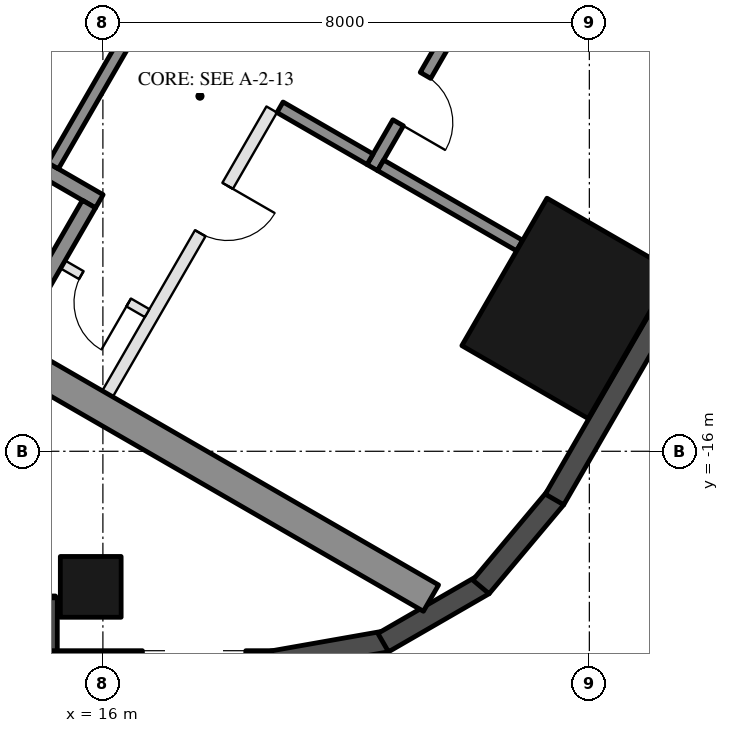
"""IFC4 building model, lengths in metres.
Left out: names, types, materials, properties, quantities, classifications, styles, units other than length and angle.
Written with IfcOpenShell. Run it as: python <this file> out.ifc"""

import sys

from ifc_helpers import new_model, si_unit, direction, frame, frame_2d, origin, origin_2d, place, context, subcontext, project, spatial, rectangle, hollow_rectangle, extrude, element, fill, save


model = new_model("IFC4")
c1 = context("Model", 3, precision=1e-05, world=origin(), true_north=direction((0.0, 1.0)))
c2 = subcontext(c1, "Body", "Model", "MODEL_VIEW")
j1 = project(units=[si_unit("LENGTHUNIT", "METRE"), si_unit("PLANEANGLEUNIT", "RADIAN")], contexts=[c1])
p1 = place(None, origin())
s1 = spatial("IfcSite", under=j1, at=p1, CompositionType="ELEMENT")
p2 = place(p1, origin())
s2 = spatial("IfcBuilding", under=s1, at=p2, CompositionType="ELEMENT")
p3 = place(p2, frame((0.0, 0.0, 65.0)))
s3 = spatial("IfcBuildingStorey", under=s2, at=p3, CompositionType="ELEMENT", Elevation=65.0)
p4 = place(p3, frame((15.8, -18.23, 0.0), z_axis=(0.0, 0.0, 1.0), x_axis=(-1.0, 0.0, 0.0)))
e1 = element("IfcColumn", 1, at=p4, inside=s3, PredefinedType="COLUMN", context=c2, shape_type="SweptSolid", body=[
    extrude(hollow_rectangle(XDim=1.0, YDim=1.0, WallThickness=0.045, at=origin_2d()), origin(), (0.0, 0.0, 1.0), 3.7),
])
p5 = place(p3, frame((23.643, -13.65, 0.0), z_axis=(0.0, 0.0, 1.0), x_axis=(0.5, 0.866025403784, 0.0)))
e2 = element("IfcColumn", 2, at=p5, inside=s3, PredefinedType="COLUMN", context=c2, shape_type="SweptSolid", body=[
    extrude(hollow_rectangle(XDim=2.8, YDim=2.4, WallThickness=0.07, at=origin_2d()), origin(), (0.0, 0.0, 1.0), 3.7),
])
p6 = place(p3, frame((8.48, -18.555, 0.0), z_axis=(0.0, 0.0, 1.0), x_axis=(1.0, 0.0, 0.0)))
e3 = element("IfcWall", 3, at=p6, inside=s3, PredefinedType="SOLIDWALL", context=c2, shape_type="SweptSolid", body=[
    extrude(rectangle(XDim=6.74, YDim=0.35, at=frame_2d((3.37, 0.0))), origin(), (0.0, 0.0, 1.0), 3.55),
])
p7 = place(p6, frame((3.57, 0.0, 0.0)))
e4 = element("IfcOpeningElement", 4, at=p7, cuts=e3, PredefinedType="OPENING", context=c2, shape_type="SweptSolid", body=[
    extrude(rectangle(XDim=2.4, YDim=2.4, at=frame_2d((1.2, 1.2))), frame((0.0, 0.185, 0.0), z_axis=(0.0, -1.0, 0.0), x_axis=(1.0, 0.0, 0.0)), (0.0, 0.0, 1.0), 0.37),
])
p8 = place(p6, frame((0.77, 0.0, 0.3)))
e5 = element("IfcOpeningElement", 5, at=p8, cuts=e3, PredefinedType="OPENING", context=c2, shape_type="SweptSolid", body=[
    extrude(rectangle(XDim=2.5, YDim=2.65, at=frame_2d((1.25, 1.325))), frame((0.0, 0.185, 0.0), z_axis=(0.0, -1.0, 0.0), x_axis=(1.0, 0.0, 0.0)), (0.0, 0.0, 1.0), 0.37),
])
p9 = place(p3, frame((15.075, -18.41, 0.0), z_axis=(0.0, 0.0, 1.0), x_axis=(0.0, -1.0, 0.0)))
e6 = element("IfcWall", 6, at=p9, inside=s3, PredefinedType="SOLIDWALL", context=c2, shape_type="SweptSolid", body=[
    extrude(rectangle(XDim=1.22, YDim=0.35, at=frame_2d((0.61, 0.0))), origin(), (0.0, 0.0, 1.0), 3.55),
])
p10 = place(p3, frame((14.9, -19.455, 0.0), z_axis=(0.0, 0.0, 1.0), x_axis=(1.0, 0.0, 0.0)))
e7 = element("IfcWall", 7, at=p10, inside=s3, PredefinedType="SOLIDWALL", context=c2, shape_type="SweptSolid", body=[
    extrude(rectangle(XDim=3.916, YDim=0.35, at=frame_2d((1.958, 0.0))), origin(), (0.0, 0.0, 1.0), 3.55),
])
p11 = place(p10, frame((1.75, 0.0, 0.3)))
e8 = element("IfcOpeningElement", 8, at=p11, cuts=e7, PredefinedType="OPENING", context=c2, shape_type="SweptSolid", body=[
    extrude(rectangle(XDim=1.7, YDim=2.65, at=frame_2d((0.85, 1.325))), frame((0.0, 0.185, 0.0), z_axis=(0.0, -1.0, 0.0), x_axis=(1.0, 0.0, 0.0)), (0.0, 0.0, 1.0), 0.37),
])
p12 = place(p3, frame((18.785, -19.458, 0.0), z_axis=(0.0, 0.0, 1.0), x_axis=(0.984798995425, 0.173697837091, 0.0)))
e9 = element("IfcWall", 9, at=p12, inside=s3, PredefinedType="SOLIDWALL", context=c2, shape_type="SweptSolid", body=[
    extrude(rectangle(XDim=1.91, YDim=0.35, at=frame_2d((0.955, 0.0))), origin(), (0.0, 0.0, 1.0), 3.55),
])
for number, where, z_axis, x_axis in (
    (10, (20.61, -19.147, 0.0), (0.0, 0.0, 1.0), (0.866, 0.5, 0.0)),
    (11, (22.217, -18.231, 0.0), (0.0, 0.0, 1.0), (0.643, 0.766, 0.0)),
):
    element("IfcWall", number, at=place(p3, frame(where, z_axis=z_axis, x_axis=x_axis)), inside=s3, PredefinedType="SOLIDWALL", context=c2, shape_type="SweptSolid", body=[
        extrude(rectangle(XDim=1.91, YDim=0.35, at=frame_2d((0.955, 0.0))), origin(), (0.0, 0.0, 1.0), 3.55),
    ])
p13 = place(p3, frame((23.427, -16.792, 0.0), z_axis=(0.0, 0.0, 1.0), x_axis=(0.500018773155, 0.866014564827, 0.0)))
e12 = element("IfcWall", 12, at=p13, inside=s3, PredefinedType="SOLIDWALL", context=c2, shape_type="SweptSolid", body=[
    extrude(rectangle(XDim=5.658, YDim=0.35, at=frame_2d((2.829, 0.0))), origin(), (0.0, 0.0, 1.0), 3.55),
])
for number, where, z_axis, x_axis in (
    (13, (8.547, -10.997, 0.0), (0.0, 0.0, 1.0), (0.866, -0.5, 0.0)),
    (14, (13.797, -1.903, 0.0), (0.0, 0.0, 1.0), (0.866, -0.5, 0.0)),
):
    element("IfcWall", number, at=place(p3, frame(where, z_axis=z_axis, x_axis=x_axis)), inside=s3, PredefinedType="SHEAR", context=c2, shape_type="SweptSolid", body=[
        extrude(rectangle(XDim=14.837, YDim=0.5, at=frame_2d((7.418, 0.0))), origin(), (0.0, 0.0, 1.0), 3.5),
    ])
p14 = place(p3, frame((10.356, -8.664, 0.0), z_axis=(0.0, 0.0, 1.0), x_axis=(0.866028629588, -0.499994412703, 0.0)))
e15 = element("IfcWall", 15, at=p14, inside=s3, PredefinedType="SHEAR", context=c2, shape_type="SweptSolid", body=[
    extrude(rectangle(XDim=6.45, YDim=0.25, at=frame_2d((3.225, 0.0))), origin(), (0.0, 0.0, 1.0), 3.5),
])
p15 = place(p14, frame((0.3, 0.0, 0.0)))
e16 = element("IfcOpeningElement", 16, at=p15, cuts=e15, PredefinedType="OPENING", context=c2, shape_type="SweptSolid", body=[
    extrude(rectangle(XDim=1.0, YDim=2.1, at=frame_2d((0.5, 1.05))), frame((0.0, 0.135, 0.0), z_axis=(0.0, -1.0, 0.0), x_axis=(1.0, 0.0, 0.0)), (0.0, 0.0, 1.0), 0.27),
])
p16 = place(p3, frame((14.496, -14.143, 0.0), z_axis=(0.0, 0.0, 1.0), x_axis=(0.500062241894, 0.865989465428, 0.0)))
e17 = element("IfcWall", 17, at=p16, inside=s3, PredefinedType="SHEAR", context=c2, shape_type="SweptSolid", body=[
    extrude(rectangle(XDim=2.55, YDim=0.25, at=frame_2d((1.275, 0.0))), origin(), (0.0, 0.0, 1.0), 3.5),
])
p17 = place(p3, frame((15.181, -11.305, 0.0), z_axis=(0.0, 0.0, 1.0), x_axis=(0.49994636267, 0.866056369097, 0.0)))
e18 = element("IfcWall", 18, at=p17, inside=s3, PredefinedType="SHEAR", context=c2, shape_type="SweptSolid", body=[
    extrude(rectangle(XDim=2.8, YDim=0.2, at=frame_2d((1.4, 0.0))), origin(), (0.0, 0.0, 1.0), 3.5),
])
p18 = place(p3, frame((20.43, -11.333, 0.0), z_axis=(0.0, 0.0, 1.0), x_axis=(0.500001309137, 0.866024647952, 0.0)))
e19 = element("IfcWall", 19, at=p18, inside=s3, PredefinedType="SHEAR", context=c2, shape_type="SweptSolid", body=[
    extrude(rectangle(XDim=2.4, YDim=0.2, at=frame_2d((1.2, 0.0))), origin(), (0.0, 0.0, 1.0), 3.5),
])
p19 = place(p18, frame((0.85, 0.0, 0.0)))
e20 = element("IfcOpeningElement", 20, at=p19, cuts=e19, PredefinedType="OPENING", context=c2, shape_type="SweptSolid", body=[
    extrude(rectangle(XDim=0.9, YDim=2.1, at=frame_2d((0.45, 1.05))), frame((0.0, 0.11, 0.0), z_axis=(0.0, -1.0, 0.0), x_axis=(1.0, 0.0, 0.0)), (0.0, 0.0, 1.0), 0.22),
])
p20 = place(p3, frame((18.913, -10.342, 0.0), z_axis=(0.0, 0.0, 1.0), x_axis=(0.866038183914, -0.499977863513, 0.0)))
e21 = element("IfcWall", 21, at=p20, inside=s3, PredefinedType="SHEAR", context=c2, shape_type="SweptSolid", body=[
    extrude(rectangle(XDim=1.71, YDim=0.2, at=frame_2d((0.855, 0.0))), origin(), (0.0, 0.0, 1.0), 3.5),
])
p21 = place(p3, frame((20.567, -11.297, 0.0), z_axis=(0.0, 0.0, 1.0), x_axis=(0.866060851709, -0.499938597367, 0.0)))
e22 = element("IfcWall", 22, at=p21, inside=s3, PredefinedType="SHEAR", context=c2, shape_type="SweptSolid", body=[
    extrude(rectangle(XDim=2.64, YDim=0.2, at=frame_2d((1.32, 0.0))), origin(), (0.0, 0.0, 1.0), 3.5),
])
p22 = place(p3, frame((16.076, -15.055, 0.0), z_axis=(0.0, 0.0, 1.0), x_axis=(0.499995103361, 0.866028230842, 0.0)))
e23 = element("IfcWall", 23, at=p22, inside=s3, PredefinedType="PARTITIONING", context=c2, shape_type="SweptSolid", body=[
    extrude(rectangle(XDim=5.4, YDim=0.2, at=frame_2d((2.7, 0.0))), origin(), (0.0, 0.0, 1.0), 3.5),
])
p23 = place(p22, frame((3.05, 0.0, 0.0)))
e24 = element("IfcOpeningElement", 24, at=p23, cuts=e23, PredefinedType="OPENING", context=c2, shape_type="SweptSolid", body=[
    extrude(rectangle(XDim=0.9, YDim=2.1, at=frame_2d((0.45, 1.05))), frame((0.0, 0.11, 0.0), z_axis=(0.0, -1.0, 0.0), x_axis=(1.0, 0.0, 0.0)), (0.0, 0.0, 1.0), 0.22),
])
p24 = place(p3, frame((15.342, -12.928, 0.0), z_axis=(0.0, 0.0, 1.0), x_axis=(0.865989903783, -0.500061482766, 0.0)))
e25 = element("IfcWall", 25, at=p24, inside=s3, PredefinedType="PARTITIONING", context=c2, shape_type="SweptSolid", body=[
    extrude(rectangle(XDim=1.6, YDim=0.15, at=frame_2d((0.8, 0.0))), origin(), (0.0, 0.0, 1.0), 3.5),
])
p25 = place(p24, frame((0.35, 0.0, 0.0)))
e26 = element("IfcOpeningElement", 26, at=p25, cuts=e25, PredefinedType="OPENING", context=c2, shape_type="SweptSolid", body=[
    extrude(rectangle(XDim=0.9, YDim=2.1, at=frame_2d((0.45, 1.05))), frame((0.0, 0.085, 0.0), z_axis=(0.0, -1.0, 0.0), x_axis=(1.0, 0.0, 0.0)), (0.0, 0.0, 1.0), 0.17),
])
p26 = place(p25, frame((0.9, 0.0, 0.0), z_axis=(0.0, 0.0, 1.0), x_axis=(-1.0, 0.0, 0.0)))
e27 = element("IfcDoor", 27, at=p26, inside=s3, OperationType="SINGLE_SWING_LEFT", PredefinedType="DOOR", context=c2, shape_type="SweptSolid", body=[
    extrude(rectangle(XDim=0.9, YDim=2.1, at=frame_2d((0.45, 1.05))), frame((0.0, 0.025, 0.0), z_axis=(0.0, -1.0, 0.0), x_axis=(1.0, 0.0, 0.0)), (0.0, 0.0, 1.0), 0.05),
])
fill(e26, e27)
p27 = place(p19, frame((0.9, 0.0, 0.0), z_axis=(0.0, 0.0, 1.0), x_axis=(-1.0, 0.0, 0.0)))
e28 = element("IfcDoor", 28, at=p27, inside=s3, OperationType="SINGLE_SWING_RIGHT", PredefinedType="DOOR", context=c2, shape_type="SweptSolid", body=[
    extrude(rectangle(XDim=0.9, YDim=2.1, at=frame_2d((0.45, 1.05))), frame((0.0, 0.025, 0.0), z_axis=(0.0, -1.0, 0.0), x_axis=(1.0, 0.0, 0.0)), (0.0, 0.0, 1.0), 0.05),
])
fill(e20, e28)
p28 = place(p23, frame((0.9, 0.0, 0.0), z_axis=(0.0, 0.0, 1.0), x_axis=(-1.0, 0.0, 0.0)))
e29 = element("IfcDoor", 29, at=p28, inside=s3, OperationType="SINGLE_SWING_LEFT", PredefinedType="DOOR", context=c2, shape_type="SweptSolid", body=[
    extrude(rectangle(XDim=0.9, YDim=2.1, at=frame_2d((0.45, 1.05))), frame((0.0, 0.025, 0.0), z_axis=(0.0, -1.0, 0.0), x_axis=(1.0, 0.0, 0.0)), (0.0, 0.0, 1.0), 0.05),
])
fill(e24, e29)
save(model, sys.argv[1])
